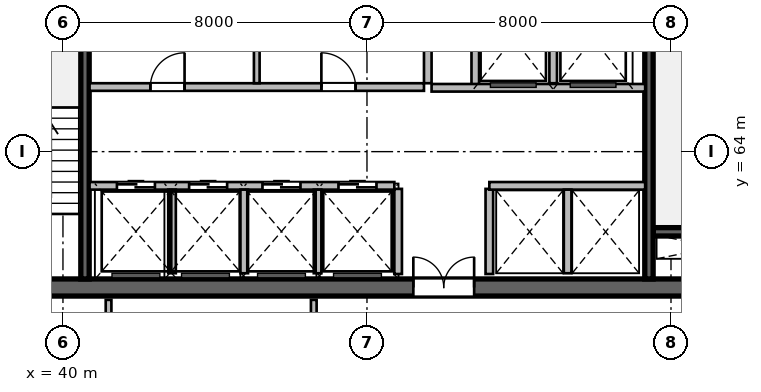
"""IFC4 building model, lengths in metres.
Left out: names, types, materials, properties, quantities, classifications, styles, units other than length and angle.
Written with IfcOpenShell. Run it as: python <this file> out.ifc"""

import sys

from ifc_helpers import new_model, si_unit, direction, frame, frame_2d, origin, place, context, subcontext, project, spatial, rectangle, extrude, source, transform, mapped, element, fill, save


model = new_model("IFC4")
c1 = context("Model", 3, precision=1e-05, world=origin(), true_north=direction((0.0, 1.0)))
c2 = subcontext(c1, "Body", "Model", "MODEL_VIEW")
j1 = project(units=[si_unit("LENGTHUNIT", "METRE"), si_unit("PLANEANGLEUNIT", "RADIAN")], contexts=[c1])
p1 = place(None, origin())
s1 = spatial("IfcSite", under=j1, at=p1, CompositionType="ELEMENT")
p2 = place(p1, origin())
s2 = spatial("IfcBuilding", under=s1, at=p2, CompositionType="ELEMENT")
p3 = place(p2, frame((0.0, 0.0, 219.6)))
s3 = spatial("IfcBuildingStorey", under=s2, at=p3, CompositionType="ELEMENT", Elevation=219.6)
m1 = source(origin(), c2, "Body", "SweptSolid", [
    extrude(rectangle(XDim=21.6, YDim=0.45, at=frame_2d((10.8, 0.0))), origin(), (0.0, 0.0, 1.0), 3.9),
])
p4 = place(p3, frame((37.2, 60.425, 0.0), z_axis=(0.0, 0.0, 1.0), x_axis=(1.0, 0.0, 0.0)))
e1 = element("IfcWall", 1, at=p4, inside=s3, PredefinedType="SHEAR", context=c2, shape_type="MappedRepresentation", body=[
    mapped(m1, transform((0.0, 0.0, 0.0), scale=1.0)),
])
p5 = place(p4, frame((1.1, 0.0, 0.0)))
e2 = element("IfcOpeningElement", 2, at=p5, cuts=e1, PredefinedType="OPENING", context=c2, shape_type="SweptSolid", body=[
    extrude(rectangle(XDim=1.15, YDim=2.15, at=frame_2d((0.575, 1.075))), frame((0.0, 0.235, 0.0), z_axis=(0.0, -1.0, 0.0), x_axis=(1.0, 0.0, 0.0)), (0.0, 0.0, 1.0), 0.47),
])
p6 = place(p4, frame((19.5, 0.0, 0.0)))
e3 = element("IfcOpeningElement", 3, at=p6, cuts=e1, PredefinedType="OPENING", context=c2, shape_type="SweptSolid", body=[
    extrude(rectangle(XDim=0.9, YDim=2.1, at=frame_2d((0.45, 1.05))), frame((0.0, 0.235, 0.0), z_axis=(0.0, -1.0, 0.0), x_axis=(1.0, 0.0, 0.0)), (0.0, 0.0, 1.0), 0.47),
])
p7 = place(p4, frame((12.02, 0.0, 0.0)))
e4 = element("IfcOpeningElement", 4, at=p7, cuts=e1, PredefinedType="OPENING", context=c2, shape_type="SweptSolid", body=[
    extrude(rectangle(XDim=1.6, YDim=2.15, at=frame_2d((0.8, 1.075))), frame((0.0, 0.235, 0.0), z_axis=(0.0, -1.0, 0.0), x_axis=(1.0, 0.0, 0.0)), (0.0, 0.0, 1.0), 0.47),
])
m2 = source(origin(), c2, "Body", "SweptSolid", [
    extrude(rectangle(XDim=3.27, YDim=0.22, at=frame_2d((1.635, 0.0))), origin(), (0.0, 0.0, 1.0), 3.9),
])
p8 = place(p3, frame((55.53, 61.89, 0.0), z_axis=(0.0, 0.0, 1.0), x_axis=(1.0, 0.0, 0.0)))
e5 = element("IfcWall", 5, at=p8, inside=s3, PredefinedType="SHEAR", context=c2, shape_type="MappedRepresentation", body=[
    mapped(m2, transform((0.0, 0.0, 0.0), scale=1.0)),
])
m3 = source(origin(), c2, "Body", "SweptSolid", [
    extrude(rectangle(XDim=11.1, YDim=0.22, at=frame_2d((5.55, 0.0))), origin(), (0.0, 0.0, 1.0), 3.9),
])
p9 = place(p3, frame((40.58, 60.65, 0.0), z_axis=(0.0, 0.0, 1.0), x_axis=(0.0, 1.0, 0.0)))
e6 = element("IfcWall", 6, at=p9, inside=s3, PredefinedType="SHEAR", context=c2, shape_type="MappedRepresentation", body=[
    mapped(m3, transform((0.0, 0.0, 0.0), scale=1.0)),
])
p10 = place(p3, frame((55.42, 60.65, 0.0), z_axis=(0.0, 0.0, 1.0), x_axis=(0.0, 1.0, 0.0)))
e7 = element("IfcWall", 7, at=p10, inside=s3, PredefinedType="SHEAR", context=c2, shape_type="MappedRepresentation", body=[
    mapped(m3, transform((0.0, 0.0, 0.0), scale=1.0)),
])
p11 = place(p10, frame((9.595, 0.0, 0.0)))
e8 = element("IfcOpeningElement", 8, at=p11, cuts=e7, PredefinedType="OPENING", context=c2, shape_type="SweptSolid", body=[
    extrude(rectangle(XDim=1.15, YDim=2.15, at=frame_2d((0.575, 1.075))), frame((0.0, 0.12, 0.0), z_axis=(0.0, -1.0, 0.0), x_axis=(1.0, 0.0, 0.0)), (0.0, 0.0, 1.0), 0.24),
])
m4 = source(origin(), c2, "Body", "SweptSolid", [
    extrude(rectangle(XDim=2.24, YDim=0.2, at=frame_2d((1.12, 0.0))), origin(), (0.0, 0.0, 1.0), 3.64),
])
for number, where, z_axis, x_axis in (
    (9, (48.82, 60.78, 0.0), (0.0, 0.0, 1.0), (0.0, 1.0, 0.0)),
    (10, (51.22, 60.78, 0.0), (0.0, 0.0, 1.0), (0.0, 1.0, 0.0)),
):
    element("IfcWall", number, at=place(p3, frame(where, z_axis=z_axis, x_axis=x_axis)), inside=s3, PredefinedType="SOLIDWALL", context=c2, shape_type="MappedRepresentation", body=[
        mapped(m4, transform((0.0, 0.0, 0.0), scale=1.0)),
    ])
m5 = source(origin(), c2, "Body", "SweptSolid", [
    extrude(rectangle(XDim=5.8, YDim=0.2, at=frame_2d((2.9, 0.0))), origin(), (0.0, 0.0, 1.0), 3.64),
])
p12 = place(p3, frame((49.6, 65.8, 0.0), z_axis=(0.0, 0.0, 1.0), x_axis=(0.0, 1.0, 0.0)))
e11 = element("IfcWall", 11, at=p12, inside=s3, PredefinedType="SOLIDWALL", context=c2, shape_type="MappedRepresentation", body=[
    mapped(m5, transform((0.0, 0.0, 0.0), scale=1.0)),
])
m6 = source(origin(), c2, "Body", "SweptSolid", [
    extrude(rectangle(XDim=2.58, YDim=0.2, at=frame_2d((1.29, 0.0))), origin(), (0.0, 0.0, 1.0), 3.64),
])
p13 = place(p3, frame((50.85, 65.68, 0.0), z_axis=(0.0, 0.0, 1.0), x_axis=(0.0, 1.0, 0.0)))
e12 = element("IfcWall", 12, at=p13, inside=s3, PredefinedType="SOLIDWALL", context=c2, shape_type="MappedRepresentation", body=[
    mapped(m6, transform((0.0, 0.0, 0.0), scale=1.0)),
])
m7 = source(origin(), c2, "Body", "SweptSolid", [
    extrude(rectangle(XDim=2.4, YDim=0.2, at=frame_2d((1.2, 0.0))), origin(), (0.0, 0.0, 1.0), 3.64),
])
p14 = place(p3, frame((52.9, 65.8, 0.0), z_axis=(0.0, 0.0, 1.0), x_axis=(0.0, 1.0, 0.0)))
e13 = element("IfcWall", 13, at=p14, inside=s3, PredefinedType="SOLIDWALL", context=c2, shape_type="MappedRepresentation", body=[
    mapped(m7, transform((0.0, 0.0, 0.0), scale=1.0)),
])
m8 = source(origin(), c2, "Body", "SweptSolid", [
    extrude(rectangle(XDim=5.62, YDim=0.2, at=frame_2d((2.81, 0.0))), origin(), (0.0, 0.0, 1.0), 3.64),
])
p15 = place(p3, frame((49.7, 65.68, 0.0), z_axis=(0.0, 0.0, 1.0), x_axis=(1.0, 0.0, 0.0)))
e14 = element("IfcWall", 14, at=p15, inside=s3, PredefinedType="SOLIDWALL", context=c2, shape_type="MappedRepresentation", body=[
    mapped(m8, transform((0.0, 0.0, 0.0), scale=1.0)),
])
m9 = source(origin(), c2, "Body", "SweptSolid", [
    extrude(rectangle(XDim=8.02, YDim=0.2, at=frame_2d((4.01, 0.0))), origin(), (0.0, 0.0, 1.0), 3.64),
])
p16 = place(p3, frame((40.7, 63.1, 0.0), z_axis=(0.0, 0.0, 1.0), x_axis=(1.0, 0.0, 0.0)))
e15 = element("IfcWall", 15, at=p16, inside=s3, PredefinedType="SOLIDWALL", context=c2, shape_type="MappedRepresentation", body=[
    mapped(m9, transform((0.0, 0.0, 0.0), scale=1.0)),
])
p17 = place(p16, frame((0.72, 0.0, 0.0)))
e16 = element("IfcOpeningElement", 16, at=p17, cuts=e15, PredefinedType="OPENING", context=c2, shape_type="SweptSolid", body=[
    extrude(rectangle(XDim=1.0, YDim=2.15, at=frame_2d((0.5, 1.075))), frame((0.0, 0.11, 0.0), z_axis=(0.0, -1.0, 0.0), x_axis=(1.0, 0.0, 0.0)), (0.0, 0.0, 1.0), 0.22),
])
p18 = place(p16, frame((2.62, 0.0, 0.0)))
e17 = element("IfcOpeningElement", 17, at=p18, cuts=e15, PredefinedType="OPENING", context=c2, shape_type="SweptSolid", body=[
    extrude(rectangle(XDim=1.0, YDim=2.15, at=frame_2d((0.5, 1.075))), frame((0.0, 0.11, 0.0), z_axis=(0.0, -1.0, 0.0), x_axis=(1.0, 0.0, 0.0)), (0.0, 0.0, 1.0), 0.22),
])
p19 = place(p16, frame((4.55, 0.0, 0.0)))
e18 = element("IfcOpeningElement", 18, at=p19, cuts=e15, PredefinedType="OPENING", context=c2, shape_type="SweptSolid", body=[
    extrude(rectangle(XDim=1.0, YDim=2.15, at=frame_2d((0.5, 1.075))), frame((0.0, 0.11, 0.0), z_axis=(0.0, -1.0, 0.0), x_axis=(1.0, 0.0, 0.0)), (0.0, 0.0, 1.0), 0.22),
])
p20 = place(p16, frame((6.55, 0.0, 0.0)))
e19 = element("IfcOpeningElement", 19, at=p20, cuts=e15, PredefinedType="OPENING", context=c2, shape_type="SweptSolid", body=[
    extrude(rectangle(XDim=1.0, YDim=2.15, at=frame_2d((0.5, 1.075))), frame((0.0, 0.11, 0.0), z_axis=(0.0, -1.0, 0.0), x_axis=(1.0, 0.0, 0.0)), (0.0, 0.0, 1.0), 0.22),
])
m10 = source(origin(), c2, "Body", "SweptSolid", [
    extrude(rectangle(XDim=4.1, YDim=0.2, at=frame_2d((2.05, 0.0))), origin(), (0.0, 0.0, 1.0), 3.64),
])
p21 = place(p3, frame((51.22, 63.1, 0.0), z_axis=(0.0, 0.0, 1.0), x_axis=(1.0, 0.0, 0.0)))
e20 = element("IfcWall", 20, at=p21, inside=s3, PredefinedType="SOLIDWALL", context=c2, shape_type="MappedRepresentation", body=[
    mapped(m10, transform((0.0, 0.0, 0.0), scale=1.0)),
])
m11 = source(origin(), c2, "Body", "SweptSolid", [
    extrude(rectangle(XDim=2.2, YDim=0.2, at=frame_2d((1.1, 0.0))), origin(), (0.0, 0.0, 1.0), 3.64),
])
for number, where, z_axis, x_axis in (
    (21, (42.87, 60.8, 0.0), (0.0, 0.0, 1.0), (0.0, 1.0, 0.0)),
    (22, (44.77, 60.8, 0.0), (0.0, 0.0, 1.0), (0.0, 1.0, 0.0)),
    (23, (46.7, 60.8, 0.0), (0.0, 0.0, 1.0), (0.0, 1.0, 0.0)),
    (24, (53.28, 60.8, 0.0), (0.0, 0.0, 1.0), (0.0, 1.0, 0.0)),
):
    element("IfcWall", number, at=place(p3, frame(where, z_axis=z_axis, x_axis=x_axis)), inside=s3, PredefinedType="SOLIDWALL", context=c2, shape_type="MappedRepresentation", body=[
        mapped(m11, transform((0.0, 0.0, 0.0), scale=1.0)),
    ])
m12 = source(origin(), c2, "Body", "SweptSolid", [
    extrude(rectangle(XDim=8.8, YDim=0.2, at=frame_2d((4.4, 0.0))), origin(), (0.0, 0.0, 1.0), 3.64),
])
p22 = place(p3, frame((40.7, 65.7, 0.0), z_axis=(0.0, 0.0, 1.0), x_axis=(1.0, 0.0, 0.0)))
e25 = element("IfcWall", 25, at=p22, inside=s3, PredefinedType="SOLIDWALL", context=c2, shape_type="MappedRepresentation", body=[
    mapped(m12, transform((0.0, 0.0, 0.0), scale=1.0)),
])
p23 = place(p22, frame((1.6, 0.0, 0.0)))
e26 = element("IfcOpeningElement", 26, at=p23, cuts=e25, PredefinedType="OPENING", context=c2, shape_type="SweptSolid", body=[
    extrude(rectangle(XDim=0.9, YDim=2.1, at=frame_2d((0.45, 1.05))), frame((0.0, 0.11, 0.0), z_axis=(0.0, -1.0, 0.0), x_axis=(1.0, 0.0, 0.0)), (0.0, 0.0, 1.0), 0.22),
])
p24 = place(p22, frame((6.1, 0.0, 0.0)))
e27 = element("IfcOpeningElement", 27, at=p24, cuts=e25, PredefinedType="OPENING", context=c2, shape_type="SweptSolid", body=[
    extrude(rectangle(XDim=0.9, YDim=2.1, at=frame_2d((0.45, 1.05))), frame((0.0, 0.11, 0.0), z_axis=(0.0, -1.0, 0.0), x_axis=(1.0, 0.0, 0.0)), (0.0, 0.0, 1.0), 0.22),
])
m13 = source(origin(), c2, "Body", "SweptSolid", [
    extrude(rectangle(XDim=2.4, YDim=0.15, at=frame_2d((1.2, 0.0))), origin(), (0.0, 0.0, 1.0), 3.64),
])
p25 = place(p3, frame((45.1, 65.8, 0.0), z_axis=(0.0, 0.0, 1.0), x_axis=(0.0, 1.0, 0.0)))
e28 = element("IfcWall", 28, at=p25, inside=s3, PredefinedType="PARTITIONING", context=c2, shape_type="MappedRepresentation", body=[
    mapped(m13, transform((0.0, 0.0, 0.0), scale=1.0)),
])
m14 = source(origin(), c2, "Body", "SweptSolid", [
    extrude(rectangle(XDim=2.033, YDim=0.15, at=frame_2d((1.016, 0.0))), origin(), (0.0, 0.0, 1.0), 3.64),
])
p26 = place(p3, frame((41.2, 58.067, 0.0), z_axis=(0.0, 0.0, 1.0), x_axis=(0.0, 1.0, 0.0)))
e29 = element("IfcWall", 29, at=p26, inside=s3, PredefinedType="PARTITIONING", context=c2, shape_type="MappedRepresentation", body=[
    mapped(m14, transform((0.0, 0.0, 0.0), scale=1.0)),
])
p27 = place(p26, frame((0.591, 0.0, 0.0)))
e30 = element("IfcOpeningElement", 30, at=p27, cuts=e29, PredefinedType="OPENING", context=c2, shape_type="SweptSolid", body=[
    extrude(rectangle(XDim=0.85, YDim=2.1, at=frame_2d((0.425, 1.05))), frame((0.0, 0.085, 0.0), z_axis=(0.0, -1.0, 0.0), x_axis=(1.0, 0.0, 0.0)), (0.0, 0.0, 1.0), 0.17),
])
p28 = place(p3, frame((46.6, 58.067, 0.0), z_axis=(0.0, 0.0, 1.0), x_axis=(0.0, 1.0, 0.0)))
e31 = element("IfcWall", 31, at=p28, inside=s3, PredefinedType="PARTITIONING", context=c2, shape_type="MappedRepresentation", body=[
    mapped(m14, transform((0.0, 0.0, 0.0), scale=1.0)),
])
m15 = source(origin(), c2, "Body", "SweptSolid", [
    extrude(rectangle(XDim=1.6, YDim=2.15, at=frame_2d((0.8, 1.075))), frame((0.0, 0.025, 0.0), z_axis=(0.0, -1.0, 0.0), x_axis=(1.0, 0.0, 0.0)), (0.0, 0.0, 1.0), 0.05),
])
p29 = place(p7, origin())
e32 = element("IfcDoor", 32, at=p29, inside=s3, OperationType="DOUBLE_DOOR_SINGLE_SWING", PredefinedType="DOOR", context=c2, shape_type="MappedRepresentation", body=[
    mapped(m15, transform((0.0, 0.0, 0.0), scale=1.0)),
])
fill(e4, e32)
m16 = source(origin(), c2, "Body", "SweptSolid", [
    extrude(rectangle(XDim=1.0, YDim=2.15, at=frame_2d((0.5, 1.075))), frame((0.0, 0.025, 0.0), z_axis=(0.0, -1.0, 0.0), x_axis=(1.0, 0.0, 0.0)), (0.0, 0.0, 1.0), 0.05),
])
p30 = place(p17, origin())
e33 = element("IfcDoor", 33, at=p30, inside=s3, OperationType="DOUBLE_DOOR_SLIDING", PredefinedType="DOOR", context=c2, shape_type="MappedRepresentation", body=[
    mapped(m16, transform((0.0, 0.0, 0.0), scale=1.0)),
])
fill(e16, e33)
p31 = place(p18, origin())
e34 = element("IfcDoor", 34, at=p31, inside=s3, OperationType="DOUBLE_DOOR_SLIDING", PredefinedType="DOOR", context=c2, shape_type="MappedRepresentation", body=[
    mapped(m16, transform((0.0, 0.0, 0.0), scale=1.0)),
])
fill(e17, e34)
p32 = place(p19, origin())
e35 = element("IfcDoor", 35, at=p32, inside=s3, OperationType="DOUBLE_DOOR_SLIDING", PredefinedType="DOOR", context=c2, shape_type="MappedRepresentation", body=[
    mapped(m16, transform((0.0, 0.0, 0.0), scale=1.0)),
])
fill(e18, e35)
p33 = place(p20, origin())
e36 = element("IfcDoor", 36, at=p33, inside=s3, OperationType="DOUBLE_DOOR_SLIDING", PredefinedType="DOOR", context=c2, shape_type="MappedRepresentation", body=[
    mapped(m16, transform((0.0, 0.0, 0.0), scale=1.0)),
])
fill(e19, e36)
m17 = source(origin(), c2, "Body", "SweptSolid", [
    extrude(rectangle(XDim=0.9, YDim=2.1, at=frame_2d((0.45, 1.05))), frame((0.0, 0.025, 0.0), z_axis=(0.0, -1.0, 0.0), x_axis=(1.0, 0.0, 0.0)), (0.0, 0.0, 1.0), 0.05),
])
p34 = place(p23, origin())
e37 = element("IfcDoor", 37, at=p34, inside=s3, OperationType="SINGLE_SWING_RIGHT", PredefinedType="DOOR", context=c2, shape_type="MappedRepresentation", body=[
    mapped(m17, transform((0.0, 0.0, 0.0), scale=1.0)),
])
fill(e26, e37)
p35 = place(p24, origin())
e38 = element("IfcDoor", 38, at=p35, inside=s3, OperationType="SINGLE_SWING_LEFT", PredefinedType="DOOR", context=c2, shape_type="MappedRepresentation", body=[
    mapped(m17, transform((0.0, 0.0, 0.0), scale=1.0)),
])
fill(e27, e38)
save(model, sys.argv[1])
